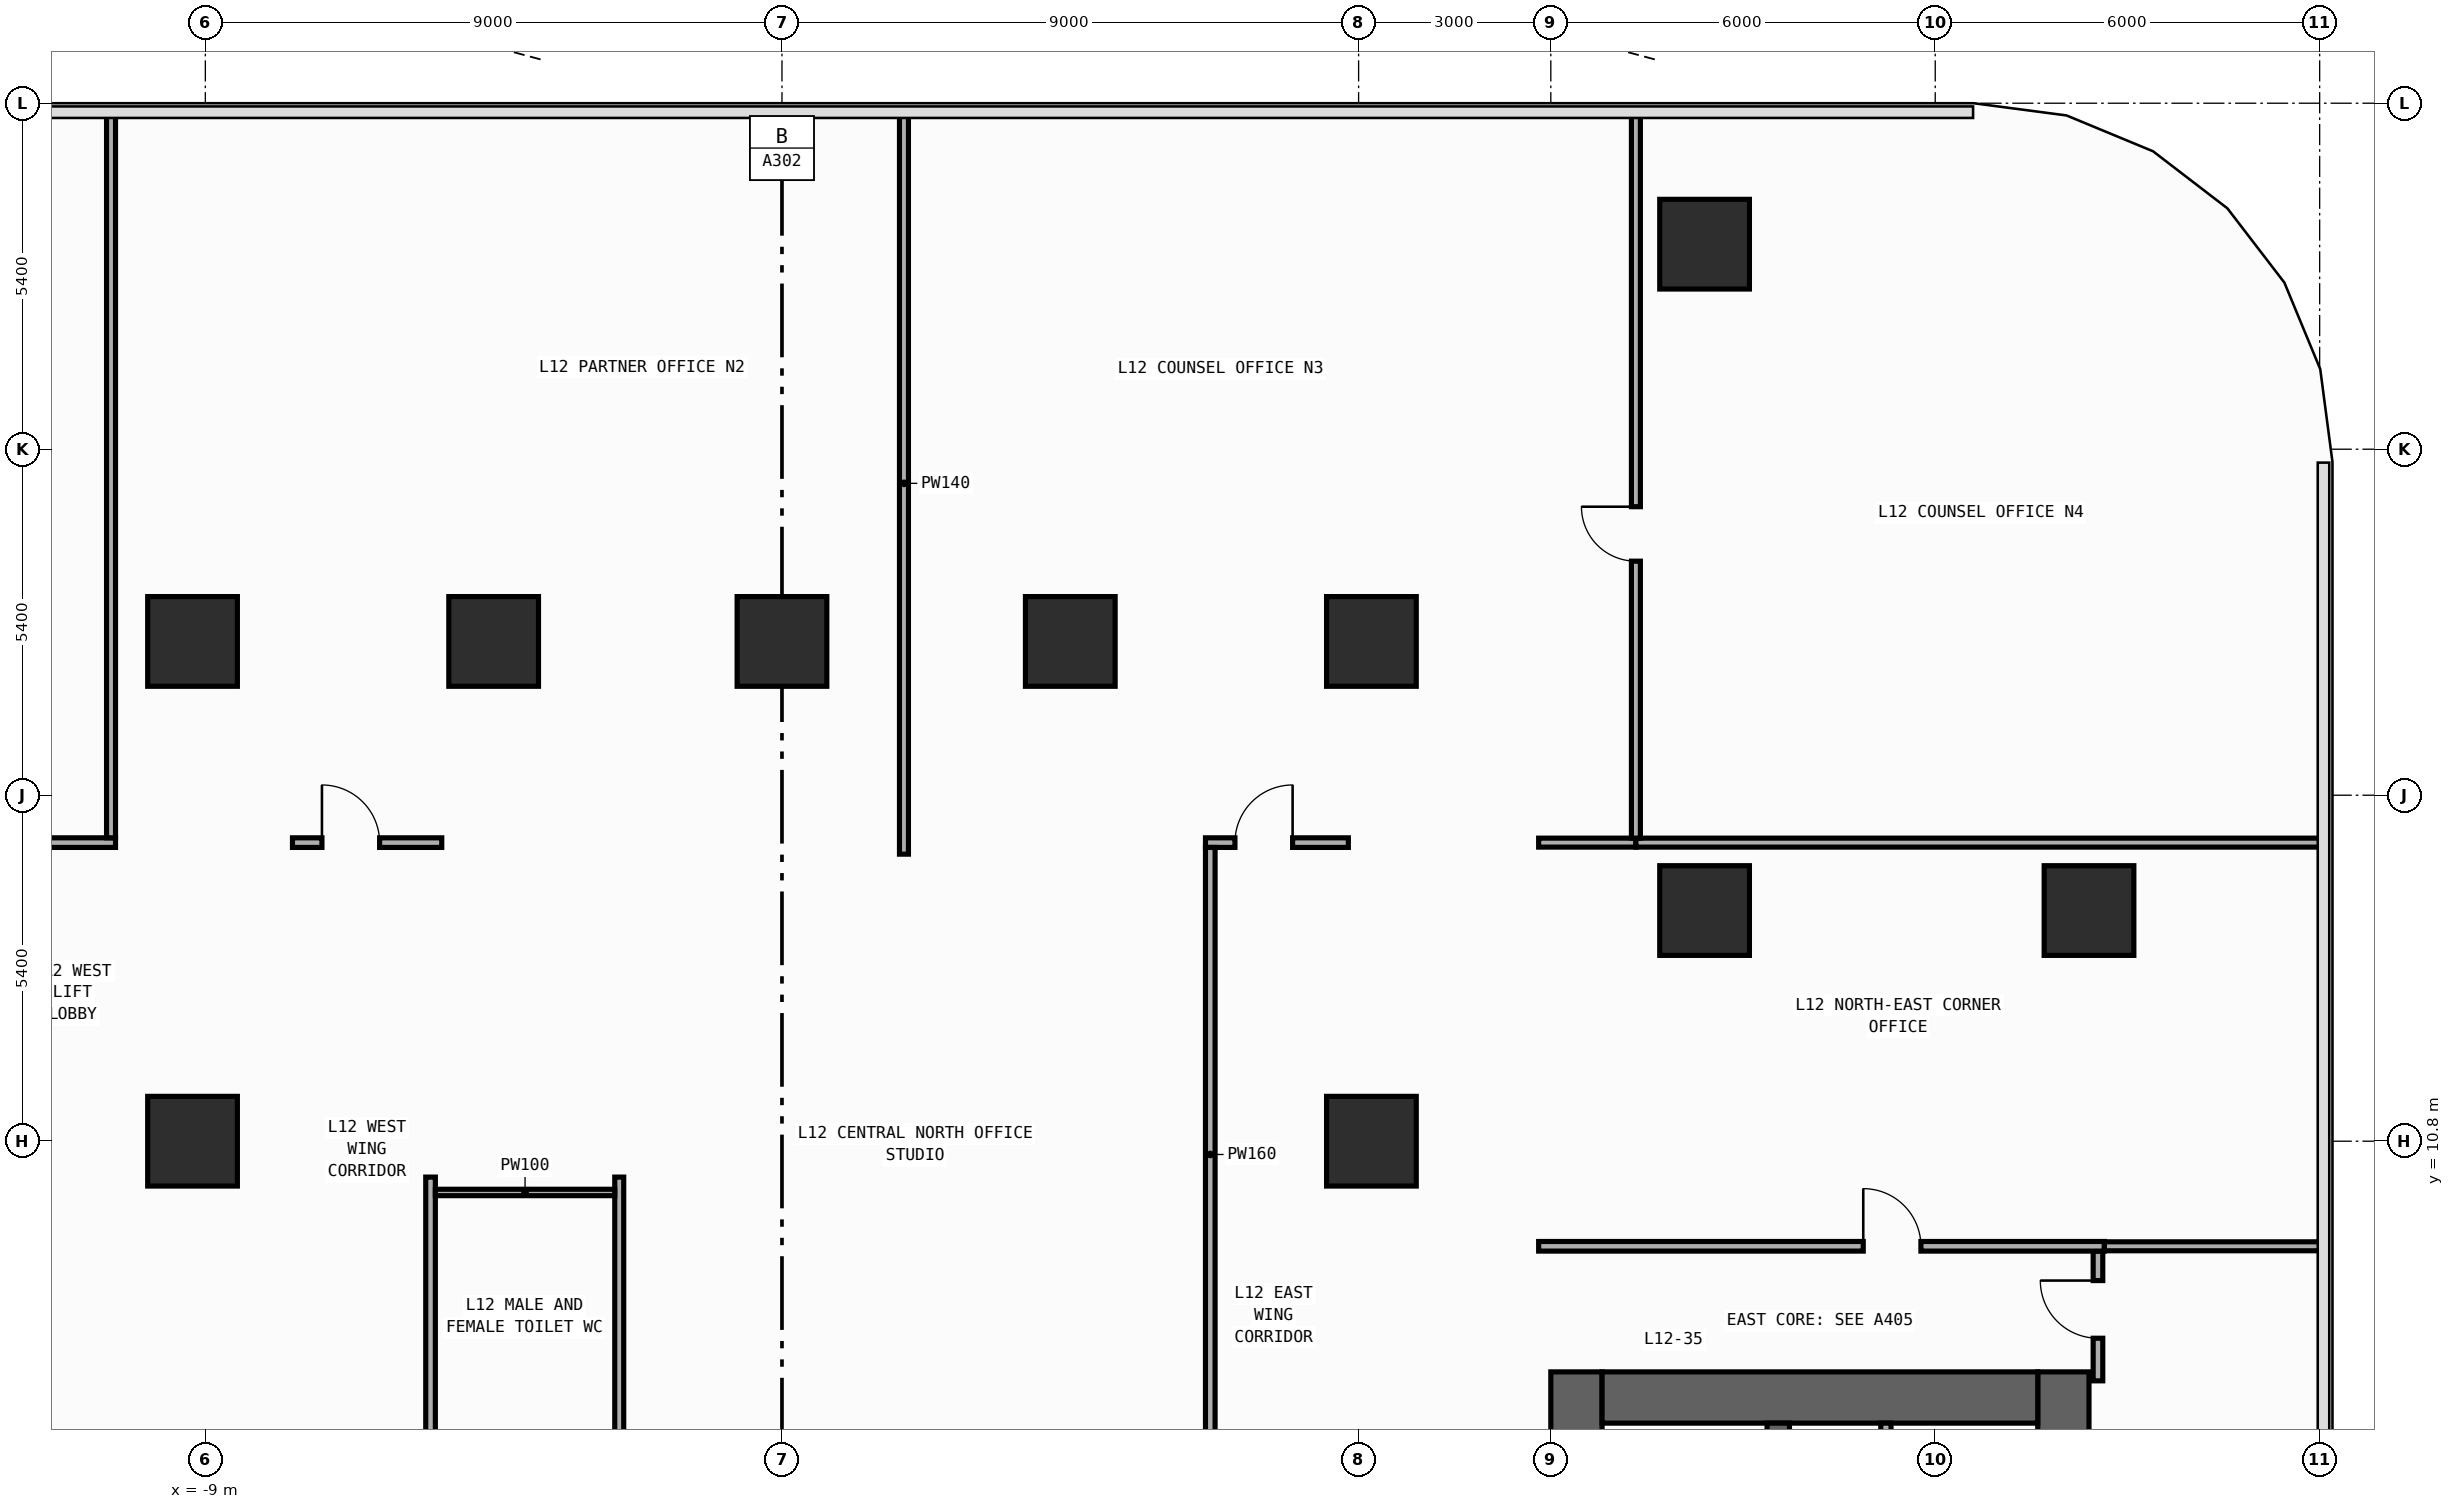
"""IFC4 building model, lengths in metres.
Left out: names, types, materials, properties, quantities, classifications, styles, units other than length and angle.
Written with IfcOpenShell. Run it as: python <this file> out.ifc"""

import sys

from ifc_helpers import new_model, si_unit, direction, frame, frame_2d, origin, origin_2d, place, context, subcontext, project, spatial, rectangle, extrude, element, fill, save


model = new_model("IFC4")
c1 = context("Model", 3, precision=1e-05, world=origin(), true_north=direction((0.0, 1.0)))
c2 = subcontext(c1, "Body", "Model", "MODEL_VIEW")
j1 = project(units=[si_unit("LENGTHUNIT", "METRE"), si_unit("PLANEANGLEUNIT", "RADIAN")], contexts=[c1])
p1 = place(None, origin())
s1 = spatial("IfcSite", under=j1, at=p1, CompositionType="ELEMENT")
p2 = place(p1, origin())
s2 = spatial("IfcBuilding", under=s1, at=p2, CompositionType="ELEMENT")
p3 = place(p2, frame((0.0, 0.0, 51.2)))
s3 = spatial("IfcBuildingStorey", under=s2, at=p3, CompositionType="ELEMENT", Elevation=51.2)
p4 = place(p3, frame((12.4, -19.8, 0.0), z_axis=(0.0, 0.0, 1.0), x_axis=(0.0, 1.0, 0.0)))
e1 = element("IfcWall", 1, at=p4, inside=s3, PredefinedType="SHEAR", context=c2, shape_type="SweptSolid", body=[
    extrude(rectangle(XDim=27.0, YDim=0.8, at=frame_2d((13.5, 0.0))), origin(), (0.0, 0.0, 1.0), 3.94),
])
p5 = place(p4, frame((23.05, 0.0, 0.0)))
e2 = element("IfcOpeningElement", 2, at=p5, cuts=e1, PredefinedType="OPENING", context=c2, shape_type="SweptSolid", body=[
    extrude(rectangle(XDim=1.1, YDim=2.2, at=frame_2d((0.55, 1.1))), frame((0.0, 0.41, 0.0), z_axis=(0.0, -1.0, 0.0), x_axis=(1.0, 0.0, 0.0)), (0.0, 0.0, 1.0), 0.82),
])
p6 = place(p4, frame((19.85, 0.0, 0.0)))
e3 = element("IfcOpeningElement", 3, at=p6, cuts=e1, PredefinedType="OPENING", context=c2, shape_type="SweptSolid", body=[
    extrude(rectangle(XDim=1.1, YDim=2.2, at=frame_2d((0.55, 1.1))), frame((0.0, 0.41, 0.0), z_axis=(0.0, -1.0, 0.0), x_axis=(1.0, 0.0, 0.0)), (0.0, 0.0, 1.0), 0.82),
])
p7 = place(p4, frame((16.65, 0.0, 0.0)))
e4 = element("IfcOpeningElement", 4, at=p7, cuts=e1, PredefinedType="OPENING", context=c2, shape_type="SweptSolid", body=[
    extrude(rectangle(XDim=1.1, YDim=2.2, at=frame_2d((0.55, 1.1))), frame((0.0, 0.41, 0.0), z_axis=(0.0, -1.0, 0.0), x_axis=(1.0, 0.0, 0.0)), (0.0, 0.0, 1.0), 0.82),
])
p8 = place(p4, frame((7.175, 0.0, 0.0)))
e5 = element("IfcOpeningElement", 5, at=p8, cuts=e1, PredefinedType="OPENING", context=c2, shape_type="SweptSolid", body=[
    extrude(rectangle(XDim=0.85, YDim=2.1, at=frame_2d((0.425, 1.05))), frame((0.0, 0.41, 0.0), z_axis=(0.0, -1.0, 0.0), x_axis=(1.0, 0.0, 0.0)), (0.0, 0.0, 1.0), 0.82),
])
p9 = place(p4, frame((10.375, 0.0, 0.0)))
e6 = element("IfcOpeningElement", 6, at=p9, cuts=e1, PredefinedType="OPENING", context=c2, shape_type="SweptSolid", body=[
    extrude(rectangle(XDim=0.85, YDim=2.1, at=frame_2d((0.425, 1.05))), frame((0.0, 0.41, 0.0), z_axis=(0.0, -1.0, 0.0), x_axis=(1.0, 0.0, 0.0)), (0.0, 0.0, 1.0), 0.82),
])
p10 = place(p4, frame((12.725, 0.0, 0.0)))
e7 = element("IfcOpeningElement", 7, at=p10, cuts=e1, PredefinedType="OPENING", context=c2, shape_type="SweptSolid", body=[
    extrude(rectangle(XDim=1.15, YDim=2.2, at=frame_2d((0.575, 1.1))), frame((0.0, 0.41, 0.0), z_axis=(0.0, -1.0, 0.0), x_axis=(1.0, 0.0, 0.0)), (0.0, 0.0, 1.0), 0.82),
])
p11 = place(p4, frame((25.125, 0.0, 0.0)))
e8 = element("IfcOpeningElement", 8, at=p11, cuts=e1, PredefinedType="OPENING", context=c2, shape_type="SweptSolid", body=[
    extrude(rectangle(XDim=0.85, YDim=2.1, at=frame_2d((0.425, 1.05))), frame((0.0, 0.41, 0.0), z_axis=(0.0, -1.0, 0.0), x_axis=(1.0, 0.0, 0.0)), (0.0, 0.0, 1.0), 0.82),
])
p12 = place(p3, frame((20.0, -19.8, 0.0), z_axis=(0.0, 0.0, 1.0), x_axis=(0.0, 1.0, 0.0)))
e9 = element("IfcWall", 9, at=p12, inside=s3, PredefinedType="SHEAR", context=c2, shape_type="SweptSolid", body=[
    extrude(rectangle(XDim=27.0, YDim=0.8, at=frame_2d((13.5, 0.0))), origin(), (0.0, 0.0, 1.0), 3.94),
])
p13 = place(p3, frame((12.8, 6.8, 0.0), z_axis=(0.0, 0.0, 1.0), x_axis=(1.0, 0.0, 0.0)))
e10 = element("IfcWall", 10, at=p13, inside=s3, PredefinedType="SHEAR", context=c2, shape_type="SweptSolid", body=[
    extrude(rectangle(XDim=6.8, YDim=0.8, at=frame_2d((3.4, 0.0))), origin(), (0.0, 0.0, 1.0), 3.94),
])
p14 = place(p3, frame((15.55, -19.0, 0.0), z_axis=(0.0, 0.0, 1.0), x_axis=(0.0, 1.0, 0.0)))
e11 = element("IfcWall", 11, at=p14, inside=s3, PredefinedType="SHEAR", context=c2, shape_type="SweptSolid", body=[
    extrude(rectangle(XDim=25.4, YDim=0.35, at=frame_2d((12.7, 0.0))), origin(), (0.0, 0.0, 1.0), 3.94),
])
p15 = place(p14, frame((11.925, 0.0, 0.0)))
e12 = element("IfcOpeningElement", 12, at=p15, cuts=e11, PredefinedType="OPENING", context=c2, shape_type="SweptSolid", body=[
    extrude(rectangle(XDim=1.15, YDim=2.2, at=frame_2d((0.575, 1.1))), frame((0.0, 0.185, 0.0), z_axis=(0.0, -1.0, 0.0), x_axis=(1.0, 0.0, 0.0)), (0.0, 0.0, 1.0), 0.37),
])
p16 = place(p14, frame((24.325, 0.0, 0.0)))
e13 = element("IfcOpeningElement", 13, at=p16, cuts=e11, PredefinedType="OPENING", context=c2, shape_type="SweptSolid", body=[
    extrude(rectangle(XDim=0.85, YDim=2.1, at=frame_2d((0.425, 1.05))), frame((0.0, 0.185, 0.0), z_axis=(0.0, -1.0, 0.0), x_axis=(1.0, 0.0, 0.0)), (0.0, 0.0, 1.0), 0.37),
])
for number, where, z_axis, x_axis in (
    (14, (-9.2, 10.8, 0.0), (0.0, 0.0, 1.0), (1.0, 0.0, 0.0)),
    (15, (-9.2, 18.6, 0.0), (0.0, 0.0, 1.0), (1.0, 0.0, 0.0)),
    (16, (9.2, 10.8, 0.0), (0.0, 0.0, 1.0), (1.0, 0.0, 0.0)),
    (17, (9.2, 18.6, 0.0), (0.0, 0.0, 1.0), (1.0, 0.0, 0.0)),
    (18, (20.4, 14.4, 0.0), (0.0, 0.0, 1.0), (1.0, 0.0, 0.0)),
    (19, (14.4, 14.4, 0.0), (0.0, 0.0, 1.0), (1.0, 0.0, 0.0)),
    (20, (-4.5, 18.6, 0.0), (0.0, 0.0, 1.0), (1.0, 0.0, 0.0)),
    (21, (0.0, 18.6, 0.0), (0.0, 0.0, 1.0), (1.0, 0.0, 0.0)),
    (22, (4.5, 18.6, 0.0), (0.0, 0.0, 1.0), (1.0, 0.0, 0.0)),
    (23, (14.4, 24.8, 0.0), (0.0, 0.0, 1.0), (1.0, 0.0, 0.0)),
):
    element("IfcColumn", number, at=place(p3, frame(where, z_axis=z_axis, x_axis=x_axis)), inside=s3, PredefinedType="COLUMN", context=c2, shape_type="SweptSolid", body=[
        extrude(rectangle(XDim=1.4, YDim=1.4, at=origin_2d()), origin(), (0.0, 0.0, 1.0), 4.2),
    ])
p17 = place(p3, frame((17.23, 4.17, 0.0), z_axis=(0.0, 0.0, 1.0), x_axis=(0.0, 1.0, 0.0)))
e24 = element("IfcWall", 24, at=p17, inside=s3, PredefinedType="PARTITIONING", context=c2, shape_type="SweptSolid", body=[
    extrude(rectangle(XDim=2.23, YDim=0.16, at=frame_2d((1.115, 0.0))), origin(), (0.0, 0.0, 1.0), 3.94),
])
p18 = place(p17, frame((0.46, 0.0, 0.0)))
e25 = element("IfcOpeningElement", 25, at=p18, cuts=e24, PredefinedType="OPENING", context=c2, shape_type="SweptSolid", body=[
    extrude(rectangle(XDim=0.85, YDim=2.1, at=frame_2d((0.425, 1.05))), frame((0.0, 0.09, 0.0), z_axis=(0.0, -1.0, 0.0), x_axis=(1.0, 0.0, 0.0)), (0.0, 0.0, 1.0), 0.18),
])
p19 = place(p3, frame((-11.99, 15.46, 0.0), z_axis=(0.0, 0.0, 1.0), x_axis=(1.0, 0.0, 0.0)))
e26 = element("IfcWall", 26, at=p19, inside=s3, PredefinedType="PARTITIONING", context=c2, shape_type="SweptSolid", body=[
    extrude(rectangle(XDim=1.588, YDim=0.15, at=frame_2d((0.794, 0.0))), origin(), (0.0, 0.0, 1.0), 3.94),
])
p20 = place(p3, frame((-7.64, 15.46, 0.0), z_axis=(0.0, 0.0, 1.0), x_axis=(1.0, 0.0, 0.0)))
e27 = element("IfcWall", 27, at=p20, inside=s3, PredefinedType="PARTITIONING", context=c2, shape_type="SweptSolid", body=[
    extrude(rectangle(XDim=2.33, YDim=0.15, at=frame_2d((1.165, 0.0))), origin(), (0.0, 0.0, 1.0), 3.94),
])
p21 = place(p20, frame((0.46, 0.0, 0.0)))
e28 = element("IfcOpeningElement", 28, at=p21, cuts=e27, PredefinedType="OPENING", context=c2, shape_type="SweptSolid", body=[
    extrude(rectangle(XDim=0.9, YDim=2.15, at=frame_2d((0.45, 1.075))), frame((0.0, 0.085, 0.0), z_axis=(0.0, -1.0, 0.0), x_axis=(1.0, 0.0, 0.0)), (0.0, 0.0, 1.0), 0.17),
])
p22 = place(p3, frame((-5.485, 3.28, 0.0), z_axis=(0.0, 0.0, 1.0), x_axis=(0.0, 1.0, 0.0)))
e29 = element("IfcWall", 29, at=p22, inside=s3, PredefinedType="PARTITIONING", context=c2, shape_type="SweptSolid", body=[
    extrude(rectangle(XDim=6.96, YDim=0.15, at=frame_2d((3.48, 0.0))), origin(), (0.0, 0.0, 1.0), 3.94),
])
p23 = place(p22, frame((1.694, 0.0, 0.0)))
e30 = element("IfcOpeningElement", 30, at=p23, cuts=e29, PredefinedType="OPENING", context=c2, shape_type="SweptSolid", body=[
    extrude(rectangle(XDim=0.9, YDim=2.15, at=frame_2d((0.45, 1.075))), frame((0.0, 0.085, 0.0), z_axis=(0.0, -1.0, 0.0), x_axis=(1.0, 0.0, 0.0)), (0.0, 0.0, 1.0), 0.17),
])
p24 = place(p3, frame((6.61, 15.46, 0.0), z_axis=(0.0, 0.0, 1.0), x_axis=(1.0, 0.0, 0.0)))
e31 = element("IfcWall", 31, at=p24, inside=s3, PredefinedType="PARTITIONING", context=c2, shape_type="SweptSolid", body=[
    extrude(rectangle(XDim=2.23, YDim=0.15, at=frame_2d((1.115, 0.0))), origin(), (0.0, 0.0, 1.0), 3.94),
])
p25 = place(p24, frame((0.46, 0.0, 0.0)))
e32 = element("IfcOpeningElement", 32, at=p25, cuts=e31, PredefinedType="OPENING", context=c2, shape_type="SweptSolid", body=[
    extrude(rectangle(XDim=0.9, YDim=2.15, at=frame_2d((0.45, 1.075))), frame((0.0, 0.085, 0.0), z_axis=(0.0, -1.0, 0.0), x_axis=(1.0, 0.0, 0.0)), (0.0, 0.0, 1.0), 0.17),
])
p26 = place(p3, frame((6.685, -0.02, 0.0), z_axis=(0.0, 0.0, 1.0), x_axis=(0.0, 1.0, 0.0)))
e33 = element("IfcWall", 33, at=p26, inside=s3, PredefinedType="PARTITIONING", context=c2, shape_type="SweptSolid", body=[
    extrude(rectangle(XDim=15.405, YDim=0.15, at=frame_2d((7.703, 0.0))), origin(), (0.0, 0.0, 1.0), 3.94),
])
p27 = place(p26, frame((4.921, 0.0, 0.0)))
e34 = element("IfcOpeningElement", 34, at=p27, cuts=e33, PredefinedType="OPENING", context=c2, shape_type="SweptSolid", body=[
    extrude(rectangle(XDim=0.9, YDim=2.15, at=frame_2d((0.45, 1.075))), frame((0.0, 0.085, 0.0), z_axis=(0.0, -1.0, 0.0), x_axis=(1.0, 0.0, 0.0)), (0.0, 0.0, 1.0), 0.17),
])
p28 = place(p3, frame((20.54, 7.06, 0.0), z_axis=(0.0, 0.0, 1.0), x_axis=(0.0, 1.0, 0.0)))
e35 = element("IfcWall", 35, at=p28, inside=s3, PredefinedType="PARTITIONING", context=c2, shape_type="SweptSolid", body=[
    extrude(rectangle(XDim=2.025, YDim=0.15, at=frame_2d((1.012, 0.0))), origin(), (0.0, 0.0, 1.0), 3.94),
])
p29 = place(p28, frame((0.665, 0.0, 0.0)))
e36 = element("IfcOpeningElement", 36, at=p29, cuts=e35, PredefinedType="OPENING", context=c2, shape_type="SweptSolid", body=[
    extrude(rectangle(XDim=0.9, YDim=2.15, at=frame_2d((0.45, 1.075))), frame((0.0, 0.085, 0.0), z_axis=(0.0, -1.0, 0.0), x_axis=(1.0, 0.0, 0.0)), (0.0, 0.0, 1.0), 0.17),
])
p30 = place(p3, frame((11.81, 9.16, 0.0), z_axis=(0.0, 0.0, 1.0), x_axis=(1.0, 0.0, 0.0)))
e37 = element("IfcWall", 37, at=p30, inside=s3, PredefinedType="PARTITIONING", context=c2, shape_type="SweptSolid", body=[
    extrude(rectangle(XDim=8.83, YDim=0.15, at=frame_2d((4.415, 0.0))), origin(), (0.0, 0.0, 1.0), 3.94),
])
p31 = place(p30, frame((5.067, 0.0, 0.0)))
e38 = element("IfcOpeningElement", 38, at=p31, cuts=e37, PredefinedType="OPENING", context=c2, shape_type="SweptSolid", body=[
    extrude(rectangle(XDim=0.9, YDim=2.15, at=frame_2d((0.45, 1.075))), frame((0.0, 0.085, 0.0), z_axis=(0.0, -1.0, 0.0), x_axis=(1.0, 0.0, 0.0)), (0.0, 0.0, 1.0), 0.17),
])
p32 = place(p3, frame((20.64, 9.16, 0.0), z_axis=(0.0, 0.0, 1.0), x_axis=(1.0, 0.0, 0.0)))
e39 = element("IfcWall", 39, at=p32, inside=s3, PredefinedType="PARTITIONING", context=c2, shape_type="SweptSolid", body=[
    extrude(rectangle(XDim=3.415, YDim=0.14, at=frame_2d((1.708, 0.0))), origin(), (0.0, 0.0, 1.0), 3.94),
])
p33 = place(p3, frame((11.81, 15.46, 0.0), z_axis=(0.0, 0.0, 1.0), x_axis=(1.0, 0.0, 0.0)))
e40 = element("IfcWall", 40, at=p33, inside=s3, PredefinedType="PARTITIONING", context=c2, shape_type="SweptSolid", body=[
    extrude(rectangle(XDim=1.518, YDim=0.14, at=frame_2d((0.759, 0.0))), origin(), (0.0, 0.0, 1.0), 3.94),
])
p34 = place(p3, frame((13.328, 15.46, 0.0), z_axis=(0.0, 0.0, 1.0), x_axis=(1.0, 0.0, 0.0)))
e41 = element("IfcWall", 41, at=p34, inside=s3, PredefinedType="PARTITIONING", context=c2, shape_type="SweptSolid", body=[
    extrude(rectangle(XDim=10.727, YDim=0.14, at=frame_2d((5.364, 0.0))), origin(), (0.0, 0.0, 1.0), 3.94),
])
p35 = place(p3, frame((-10.472, 15.535, 0.0), z_axis=(0.0, 0.0, 1.0), x_axis=(0.0, 1.0, 0.0)))
e42 = element("IfcWall", 42, at=p35, inside=s3, PredefinedType="PARTITIONING", context=c2, shape_type="SweptSolid", body=[
    extrude(rectangle(XDim=11.32, YDim=0.14, at=frame_2d((5.66, 0.0))), origin(), (0.0, 0.0, 1.0), 3.94),
])
p36 = place(p3, frame((1.904, 15.28, 0.0), z_axis=(0.0, 0.0, 1.0), x_axis=(0.0, 1.0, 0.0)))
e43 = element("IfcWall", 43, at=p36, inside=s3, PredefinedType="PARTITIONING", context=c2, shape_type="SweptSolid", body=[
    extrude(rectangle(XDim=11.575, YDim=0.14, at=frame_2d((5.788, 0.0))), origin(), (0.0, 0.0, 1.0), 3.94),
])
p37 = place(p3, frame((13.328, 15.53, 0.0), z_axis=(0.0, 0.0, 1.0), x_axis=(0.0, 1.0, 0.0)))
e44 = element("IfcWall", 44, at=p37, inside=s3, PredefinedType="PARTITIONING", context=c2, shape_type="SweptSolid", body=[
    extrude(rectangle(XDim=11.325, YDim=0.14, at=frame_2d((5.663, 0.0))), origin(), (0.0, 0.0, 1.0), 3.94),
])
p38 = place(p37, frame((4.323, 0.0, 0.0)))
e45 = element("IfcOpeningElement", 45, at=p38, cuts=e44, PredefinedType="OPENING", context=c2, shape_type="SweptSolid", body=[
    extrude(rectangle(XDim=0.85, YDim=2.1, at=frame_2d((0.425, 1.05))), frame((0.0, 0.08, 0.0), z_axis=(0.0, -1.0, 0.0), x_axis=(1.0, 0.0, 0.0)), (0.0, 0.0, 1.0), 0.16),
])
p39 = place(p3, frame((-2.54, 3.28, 0.0), z_axis=(0.0, 0.0, 1.0), x_axis=(0.0, 1.0, 0.0)))
e46 = element("IfcWall", 46, at=p39, inside=s3, PredefinedType="PARTITIONING", context=c2, shape_type="SweptSolid", body=[
    extrude(rectangle(XDim=6.96, YDim=0.14, at=frame_2d((3.48, 0.0))), origin(), (0.0, 0.0, 1.0), 3.94),
])
p40 = place(p3, frame((-5.41, 10.0, 0.0), z_axis=(0.0, 0.0, 1.0), x_axis=(1.0, 0.0, 0.0)))
e47 = element("IfcWall", 47, at=p40, inside=s3, PredefinedType="PARTITIONING", context=c2, shape_type="SweptSolid", body=[
    extrude(rectangle(XDim=2.8, YDim=0.1, at=frame_2d((1.4, 0.0))), origin(), (0.0, 0.0, 1.0), 3.94),
])
p41 = place(p21, origin())
e48 = element("IfcDoor", 48, at=p41, inside=s3, OperationType="SINGLE_SWING_LEFT", PredefinedType="DOOR", context=c2, shape_type="SweptSolid", body=[
    extrude(rectangle(XDim=0.9, YDim=2.15, at=frame_2d((0.45, 1.075))), frame((0.0, 0.025, 0.0), z_axis=(0.0, -1.0, 0.0), x_axis=(1.0, 0.0, 0.0)), (0.0, 0.0, 1.0), 0.05),
])
fill(e28, e48)
p42 = place(p25, origin())
e49 = element("IfcDoor", 49, at=p42, inside=s3, OperationType="SINGLE_SWING_RIGHT", PredefinedType="DOOR", context=c2, shape_type="SweptSolid", body=[
    extrude(rectangle(XDim=0.9, YDim=2.15, at=frame_2d((0.45, 1.075))), frame((0.0, 0.025, 0.0), z_axis=(0.0, -1.0, 0.0), x_axis=(1.0, 0.0, 0.0)), (0.0, 0.0, 1.0), 0.05),
])
fill(e32, e49)
p43 = place(p29, origin())
e50 = element("IfcDoor", 50, at=p43, inside=s3, OperationType="SINGLE_SWING_RIGHT", PredefinedType="DOOR", context=c2, shape_type="SweptSolid", body=[
    extrude(rectangle(XDim=0.9, YDim=2.15, at=frame_2d((0.45, 1.075))), frame((0.0, 0.025, 0.0), z_axis=(0.0, -1.0, 0.0), x_axis=(1.0, 0.0, 0.0)), (0.0, 0.0, 1.0), 0.05),
])
fill(e36, e50)
p44 = place(p31, origin())
e51 = element("IfcDoor", 51, at=p44, inside=s3, OperationType="SINGLE_SWING_LEFT", PredefinedType="DOOR", context=c2, shape_type="SweptSolid", body=[
    extrude(rectangle(XDim=0.9, YDim=2.15, at=frame_2d((0.45, 1.075))), frame((0.0, 0.025, 0.0), z_axis=(0.0, -1.0, 0.0), x_axis=(1.0, 0.0, 0.0)), (0.0, 0.0, 1.0), 0.05),
])
fill(e38, e51)
p45 = place(p38, origin())
e52 = element("IfcDoor", 52, at=p45, inside=s3, OperationType="SINGLE_SWING_RIGHT", PredefinedType="DOOR", context=c2, shape_type="SweptSolid", body=[
    extrude(rectangle(XDim=0.85, YDim=2.1, at=frame_2d((0.425, 1.05))), frame((0.0, 0.025, 0.0), z_axis=(0.0, -1.0, 0.0), x_axis=(1.0, 0.0, 0.0)), (0.0, 0.0, 1.0), 0.05),
])
fill(e45, e52)
save(model, sys.argv[1])
